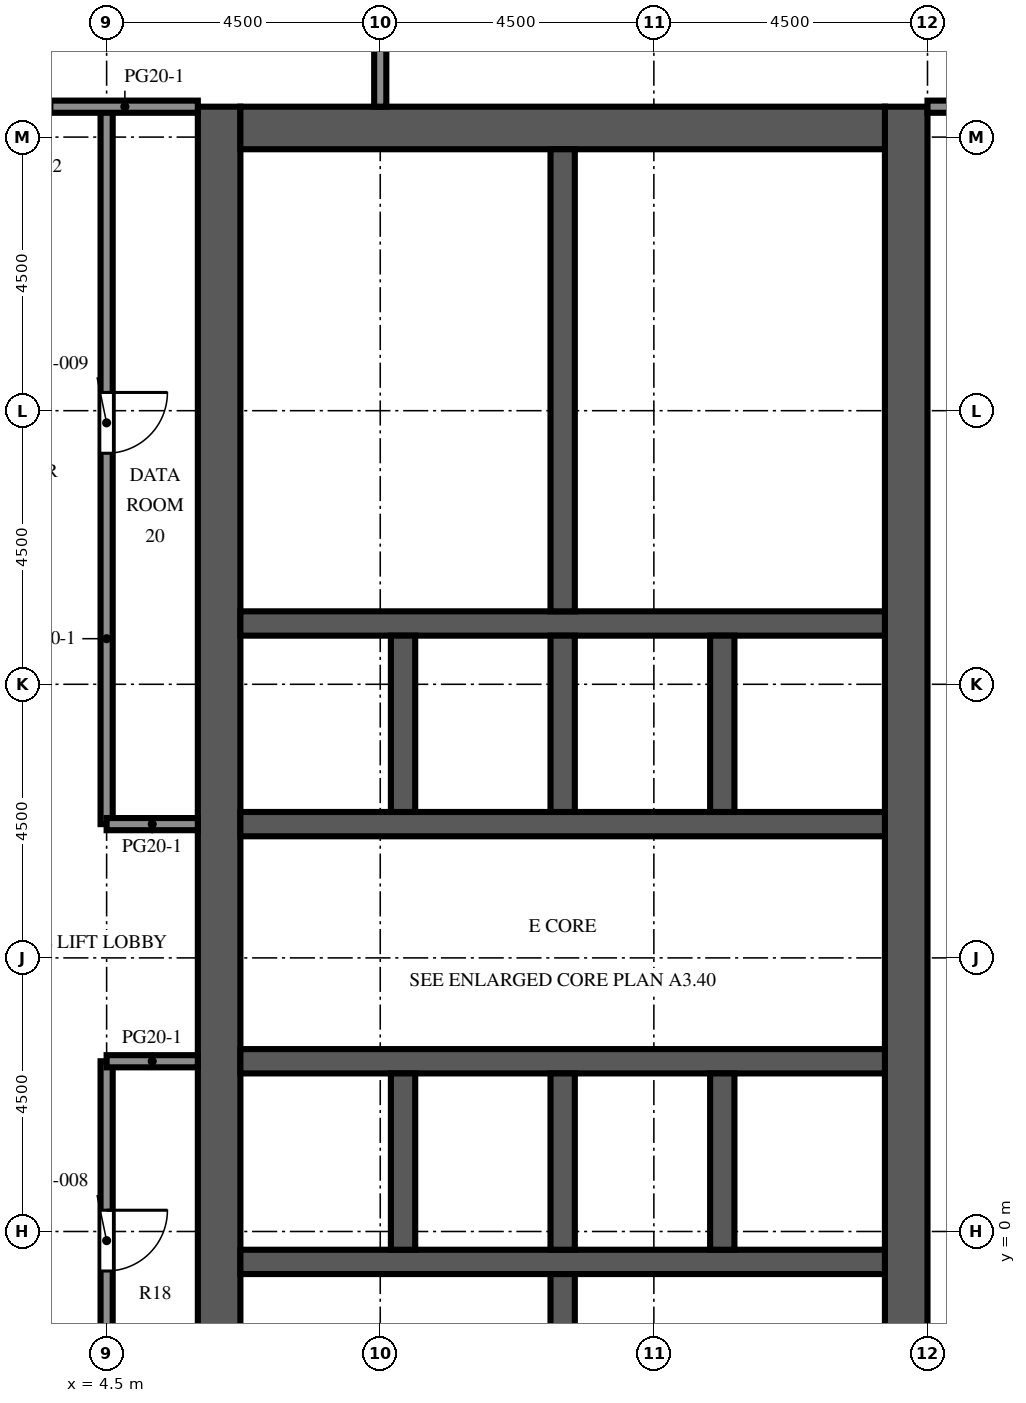
"""IFC4 building model, lengths in metres.
Left out: names, types, materials, properties, quantities, classifications, styles, units other than length and angle.
Written with IfcOpenShell. Run it as: python <this file> out.ifc"""

import sys

from ifc_helpers import new_model, si_unit, direction, frame, frame_2d, origin, place, context, subcontext, project, spatial, rectangle, extrude, element, fill, save


model = new_model("IFC4")
c1 = context("Model", 3, precision=1e-05, world=origin(), true_north=direction((0.0, 1.0)))
c2 = subcontext(c1, "Body", "Model", "MODEL_VIEW")
j1 = project(units=[si_unit("LENGTHUNIT", "METRE"), si_unit("PLANEANGLEUNIT", "RADIAN")], contexts=[c1])
p1 = place(None, origin())
s1 = spatial("IfcSite", under=j1, at=p1, CompositionType="ELEMENT")
p2 = place(p1, origin())
s2 = spatial("IfcBuilding", under=s1, at=p2, CompositionType="ELEMENT")
p3 = place(p2, frame((0.0, 0.0, 274.5)))
s3 = spatial("IfcBuildingStorey", under=s2, at=p3, CompositionType="ELEMENT", Elevation=274.5)
p4 = place(p3, frame((6.35, -9.0, 0.0), z_axis=(0.0, 0.0, 1.0), x_axis=(0.0, 1.0, 0.0)))
e1 = element("IfcWall", 1, at=p4, inside=s3, PredefinedType="SHEAR", context=c2, shape_type="SweptSolid", body=[
    extrude(rectangle(XDim=27.5, YDim=0.7, at=frame_2d((13.75, 0.0))), origin(), (0.0, 0.0, 1.0), 4.1),
])
p5 = place(p4, frame((12.55, 0.0, 0.0)))
e2 = element("IfcOpeningElement", 2, at=p5, cuts=e1, PredefinedType="OPENING", context=c2, shape_type="SweptSolid", body=[
    extrude(rectangle(XDim=2.4, YDim=2.4, at=frame_2d((1.2, 1.2))), frame((0.0, 0.36, 0.0), z_axis=(0.0, -1.0, 0.0), x_axis=(1.0, 0.0, 0.0)), (0.0, 0.0, 1.0), 0.72),
])
p6 = place(p4, frame((3.9, 0.0, 0.0)))
e3 = element("IfcOpeningElement", 3, at=p6, cuts=e1, PredefinedType="OPENING", context=c2, shape_type="SweptSolid", body=[
    extrude(rectangle(XDim=1.2, YDim=2.1, at=frame_2d((0.6, 1.05))), frame((0.0, 0.36, 0.0), z_axis=(0.0, -1.0, 0.0), x_axis=(1.0, 0.0, 0.0)), (0.0, 0.0, 1.0), 0.72),
])
p7 = place(p4, frame((19.46, 0.0, 0.0)))
e4 = element("IfcOpeningElement", 4, at=p7, cuts=e1, PredefinedType="OPENING", context=c2, shape_type="SweptSolid", body=[
    extrude(rectangle(XDim=1.0, YDim=2.1, at=frame_2d((0.5, 1.05))), frame((0.0, 0.36, 0.0), z_axis=(0.0, -1.0, 0.0), x_axis=(1.0, 0.0, 0.0)), (0.0, 0.0, 1.0), 0.72),
])
p8 = place(p4, frame((21.17, 0.0, 0.0)))
e5 = element("IfcOpeningElement", 5, at=p8, cuts=e1, PredefinedType="OPENING", context=c2, shape_type="SweptSolid", body=[
    extrude(rectangle(XDim=1.0, YDim=2.1, at=frame_2d((0.5, 1.05))), frame((0.0, 0.36, 0.0), z_axis=(0.0, -1.0, 0.0), x_axis=(1.0, 0.0, 0.0)), (0.0, 0.0, 1.0), 0.72),
])
p9 = place(p4, frame((23.26, 0.0, 0.0)))
e6 = element("IfcOpeningElement", 6, at=p9, cuts=e1, PredefinedType="OPENING", context=c2, shape_type="SweptSolid", body=[
    extrude(rectangle(XDim=1.0, YDim=2.1, at=frame_2d((0.5, 1.05))), frame((0.0, 0.36, 0.0), z_axis=(0.0, -1.0, 0.0), x_axis=(1.0, 0.0, 0.0)), (0.0, 0.0, 1.0), 0.72),
])
p10 = place(p4, frame((25.35, 0.0, 0.0)))
e7 = element("IfcOpeningElement", 7, at=p10, cuts=e1, PredefinedType="OPENING", context=c2, shape_type="SweptSolid", body=[
    extrude(rectangle(XDim=1.0, YDim=2.1, at=frame_2d((0.5, 1.05))), frame((0.0, 0.36, 0.0), z_axis=(0.0, -1.0, 0.0), x_axis=(1.0, 0.0, 0.0)), (0.0, 0.0, 1.0), 0.72),
])
p11 = place(p3, frame((17.65, -9.0, 0.0), z_axis=(0.0, 0.0, 1.0), x_axis=(0.0, 1.0, 0.0)))
e8 = element("IfcWall", 8, at=p11, inside=s3, PredefinedType="SHEAR", context=c2, shape_type="SweptSolid", body=[
    extrude(rectangle(XDim=27.5, YDim=0.7, at=frame_2d((13.75, 0.0))), origin(), (0.0, 0.0, 1.0), 4.1),
])
p12 = place(p11, frame((12.55, 0.0, 0.0)))
e9 = element("IfcOpeningElement", 9, at=p12, cuts=e8, PredefinedType="OPENING", context=c2, shape_type="SweptSolid", body=[
    extrude(rectangle(XDim=2.4, YDim=2.4, at=frame_2d((1.2, 1.2))), frame((0.0, 0.36, 0.0), z_axis=(0.0, -1.0, 0.0), x_axis=(1.0, 0.0, 0.0)), (0.0, 0.0, 1.0), 0.72),
])
p13 = place(p11, frame((6.825, 0.0, 0.0)))
e10 = element("IfcOpeningElement", 10, at=p13, cuts=e8, PredefinedType="OPENING", context=c2, shape_type="SweptSolid", body=[
    extrude(rectangle(XDim=1.2, YDim=2.1, at=frame_2d((0.6, 1.05))), frame((0.0, 0.36, 0.0), z_axis=(0.0, -1.0, 0.0), x_axis=(1.0, 0.0, 0.0)), (0.0, 0.0, 1.0), 0.72),
])
p14 = place(p11, frame((19.475, 0.0, 0.0)))
e11 = element("IfcOpeningElement", 11, at=p14, cuts=e8, PredefinedType="OPENING", context=c2, shape_type="SweptSolid", body=[
    extrude(rectangle(XDim=1.2, YDim=2.1, at=frame_2d((0.6, 1.05))), frame((0.0, 0.36, 0.0), z_axis=(0.0, -1.0, 0.0), x_axis=(1.0, 0.0, 0.0)), (0.0, 0.0, 1.0), 0.72),
])
p15 = place(p3, frame((6.7, 18.15, 0.0), z_axis=(0.0, 0.0, 1.0), x_axis=(1.0, 0.0, 0.0)))
e12 = element("IfcWall", 12, at=p15, inside=s3, PredefinedType="SHEAR", context=c2, shape_type="SweptSolid", body=[
    extrude(rectangle(XDim=10.6, YDim=0.7, at=frame_2d((5.3, 0.0))), origin(), (0.0, 0.0, 1.0), 4.1),
])
p16 = place(p3, frame((6.7, -0.5, 0.0), z_axis=(0.0, 0.0, 1.0), x_axis=(1.0, 0.0, 0.0)))
e13 = element("IfcWall", 13, at=p16, inside=s3, PredefinedType="SHEAR", context=c2, shape_type="SweptSolid", body=[
    extrude(rectangle(XDim=10.6, YDim=0.4, at=frame_2d((5.3, 0.0))), origin(), (0.0, 0.0, 1.0), 4.1),
])
p17 = place(p3, frame((6.7, 2.8, 0.0), z_axis=(0.0, 0.0, 1.0), x_axis=(1.0, 0.0, 0.0)))
e14 = element("IfcWall", 14, at=p17, inside=s3, PredefinedType="SHEAR", context=c2, shape_type="SweptSolid", body=[
    extrude(rectangle(XDim=10.6, YDim=0.4, at=frame_2d((5.3, 0.0))), origin(), (0.0, 0.0, 1.0), 4.1),
])
p18 = place(p17, frame((0.688, 0.0, 0.0)))
e15 = element("IfcOpeningElement", 15, at=p18, cuts=e14, PredefinedType="OPENING", context=c2, shape_type="SweptSolid", body=[
    extrude(rectangle(XDim=1.1, YDim=2.1, at=frame_2d((0.55, 1.05))), frame((0.0, 0.21, 0.0), z_axis=(0.0, -1.0, 0.0), x_axis=(1.0, 0.0, 0.0)), (0.0, 0.0, 1.0), 0.42),
])
p19 = place(p17, frame((3.438, 0.0, 0.0)))
e16 = element("IfcOpeningElement", 16, at=p19, cuts=e14, PredefinedType="OPENING", context=c2, shape_type="SweptSolid", body=[
    extrude(rectangle(XDim=1.1, YDim=2.1, at=frame_2d((0.55, 1.05))), frame((0.0, 0.21, 0.0), z_axis=(0.0, -1.0, 0.0), x_axis=(1.0, 0.0, 0.0)), (0.0, 0.0, 1.0), 0.42),
])
p20 = place(p17, frame((6.113, 0.0, 0.0)))
e17 = element("IfcOpeningElement", 17, at=p20, cuts=e14, PredefinedType="OPENING", context=c2, shape_type="SweptSolid", body=[
    extrude(rectangle(XDim=1.0, YDim=2.1, at=frame_2d((0.5, 1.05))), frame((0.0, 0.21, 0.0), z_axis=(0.0, -1.0, 0.0), x_axis=(1.0, 0.0, 0.0)), (0.0, 0.0, 1.0), 0.42),
])
p21 = place(p17, frame((8.863, 0.0, 0.0)))
e18 = element("IfcOpeningElement", 18, at=p21, cuts=e14, PredefinedType="OPENING", context=c2, shape_type="SweptSolid", body=[
    extrude(rectangle(XDim=1.0, YDim=2.1, at=frame_2d((0.5, 1.05))), frame((0.0, 0.21, 0.0), z_axis=(0.0, -1.0, 0.0), x_axis=(1.0, 0.0, 0.0)), (0.0, 0.0, 1.0), 0.42),
])
p22 = place(p3, frame((6.7, 6.7, 0.0), z_axis=(0.0, 0.0, 1.0), x_axis=(1.0, 0.0, 0.0)))
e19 = element("IfcWall", 19, at=p22, inside=s3, PredefinedType="SHEAR", context=c2, shape_type="SweptSolid", body=[
    extrude(rectangle(XDim=10.6, YDim=0.4, at=frame_2d((5.3, 0.0))), origin(), (0.0, 0.0, 1.0), 4.1),
])
p23 = place(p22, frame((3.438, 0.0, 0.0)))
e20 = element("IfcOpeningElement", 20, at=p23, cuts=e19, PredefinedType="OPENING", context=c2, shape_type="SweptSolid", body=[
    extrude(rectangle(XDim=1.1, YDim=2.1, at=frame_2d((0.55, 1.05))), frame((0.0, 0.21, 0.0), z_axis=(0.0, -1.0, 0.0), x_axis=(1.0, 0.0, 0.0)), (0.0, 0.0, 1.0), 0.42),
])
p24 = place(p22, frame((6.062, 0.0, 0.0)))
e21 = element("IfcOpeningElement", 21, at=p24, cuts=e19, PredefinedType="OPENING", context=c2, shape_type="SweptSolid", body=[
    extrude(rectangle(XDim=1.1, YDim=2.1, at=frame_2d((0.55, 1.05))), frame((0.0, 0.21, 0.0), z_axis=(0.0, -1.0, 0.0), x_axis=(1.0, 0.0, 0.0)), (0.0, 0.0, 1.0), 0.42),
])
p25 = place(p22, frame((8.812, 0.0, 0.0)))
e22 = element("IfcOpeningElement", 22, at=p25, cuts=e19, PredefinedType="OPENING", context=c2, shape_type="SweptSolid", body=[
    extrude(rectangle(XDim=1.1, YDim=2.1, at=frame_2d((0.55, 1.05))), frame((0.0, 0.21, 0.0), z_axis=(0.0, -1.0, 0.0), x_axis=(1.0, 0.0, 0.0)), (0.0, 0.0, 1.0), 0.42),
])
p26 = place(p22, frame((0.738, 0.0, 0.0)))
e23 = element("IfcOpeningElement", 23, at=p26, cuts=e19, PredefinedType="OPENING", context=c2, shape_type="SweptSolid", body=[
    extrude(rectangle(XDim=1.0, YDim=2.1, at=frame_2d((0.5, 1.05))), frame((0.0, 0.21, 0.0), z_axis=(0.0, -1.0, 0.0), x_axis=(1.0, 0.0, 0.0)), (0.0, 0.0, 1.0), 0.42),
])
p27 = place(p3, frame((6.7, 10.0, 0.0), z_axis=(0.0, 0.0, 1.0), x_axis=(1.0, 0.0, 0.0)))
e24 = element("IfcWall", 24, at=p27, inside=s3, PredefinedType="SHEAR", context=c2, shape_type="SweptSolid", body=[
    extrude(rectangle(XDim=10.6, YDim=0.4, at=frame_2d((5.3, 0.0))), origin(), (0.0, 0.0, 1.0), 4.1),
])
for number, where, z_axis, x_axis in (
    (25, (9.375, -0.3, 0.0), (0.0, 0.0, 1.0), (0.0, 1.0, 0.0)),
    (26, (9.375, 6.9, 0.0), (0.0, 0.0, 1.0), (0.0, 1.0, 0.0)),
    (27, (12.0, -0.3, 0.0), (0.0, 0.0, 1.0), (0.0, 1.0, 0.0)),
    (28, (12.0, 6.9, 0.0), (0.0, 0.0, 1.0), (0.0, 1.0, 0.0)),
    (29, (14.625, -0.3, 0.0), (0.0, 0.0, 1.0), (0.0, 1.0, 0.0)),
    (30, (14.625, 6.9, 0.0), (0.0, 0.0, 1.0), (0.0, 1.0, 0.0)),
):
    element("IfcWall", number, at=place(p3, frame(where, z_axis=z_axis, x_axis=x_axis)), inside=s3, PredefinedType="SHEAR", context=c2, shape_type="SweptSolid", body=[
        extrude(rectangle(XDim=2.9, YDim=0.4, at=frame_2d((1.45, 0.0))), origin(), (0.0, 0.0, 1.0), 4.1),
    ])
for number, where, z_axis, x_axis in (
    (31, (12.0, -8.3, 0.0), (0.0, 0.0, 1.0), (0.0, 1.0, 0.0)),
    (32, (12.0, 10.2, 0.0), (0.0, 0.0, 1.0), (0.0, 1.0, 0.0)),
):
    element("IfcWall", number, at=place(p3, frame(where, z_axis=z_axis, x_axis=x_axis)), inside=s3, PredefinedType="SHEAR", context=c2, shape_type="SweptSolid", body=[
        extrude(rectangle(XDim=7.6, YDim=0.4, at=frame_2d((3.8, 0.0))), origin(), (0.0, 0.0, 1.0), 4.1),
    ])
for number, where, z_axis, x_axis in (
    (33, (6.7, 11.72, 0.0), (0.0, 0.0, 1.0), (1.0, 0.0, 0.0)),
    (34, (6.7, 13.62, 0.0), (0.0, 0.0, 1.0), (1.0, 0.0, 0.0)),
    (35, (6.7, 15.9, 0.0), (0.0, 0.0, 1.0), (1.0, 0.0, 0.0)),
):
    element("IfcWall", number, at=place(p3, frame(where, z_axis=z_axis, x_axis=x_axis)), inside=s3, PredefinedType="PARTITIONING", context=c2, shape_type="SweptSolid", body=[
        extrude(rectangle(XDim=5.1, YDim=0.1, at=frame_2d((2.55, 0.0))), origin(), (0.0, 0.0, 1.0), 3.65),
    ])
p28 = place(p3, frame((4.5, 2.8, 0.0), z_axis=(0.0, 0.0, 1.0), x_axis=(0.0, -1.0, 0.0)))
e36 = element("IfcWall", 36, at=p28, inside=s3, PredefinedType="PARTITIONING", context=c2, shape_type="SweptSolid", body=[
    extrude(rectangle(XDim=6.3, YDim=0.2, at=frame_2d((3.15, 0.0))), origin(), (0.0, 0.0, 1.0), 3.65),
])
p29 = place(p28, frame((2.45, 0.0, 0.0)))
e37 = element("IfcOpeningElement", 37, at=p29, cuts=e36, PredefinedType="OPENING", context=c2, shape_type="SweptSolid", body=[
    extrude(rectangle(XDim=1.0, YDim=2.1, at=frame_2d((0.5, 1.05))), frame((0.0, 0.11, 0.0), z_axis=(0.0, -1.0, 0.0), x_axis=(1.0, 0.0, 0.0)), (0.0, 0.0, 1.0), 0.22),
])
p30 = place(p3, frame((4.5, 18.5, 0.0), z_axis=(0.0, 0.0, 1.0), x_axis=(0.0, -1.0, 0.0)))
e38 = element("IfcWall", 38, at=p30, inside=s3, PredefinedType="PARTITIONING", context=c2, shape_type="SweptSolid", body=[
    extrude(rectangle(XDim=11.8, YDim=0.2, at=frame_2d((5.9, 0.0))), origin(), (0.0, 0.0, 1.0), 3.65),
])
p31 = place(p30, frame((4.7, 0.0, 0.0)))
e39 = element("IfcOpeningElement", 39, at=p31, cuts=e38, PredefinedType="OPENING", context=c2, shape_type="SweptSolid", body=[
    extrude(rectangle(XDim=1.0, YDim=2.1, at=frame_2d((0.5, 1.05))), frame((0.0, 0.11, 0.0), z_axis=(0.0, -1.0, 0.0), x_axis=(1.0, 0.0, 0.0)), (0.0, 0.0, 1.0), 0.22),
])
p32 = place(p3, frame((9.0, 18.5, 0.0), z_axis=(0.0, 0.0, 1.0), x_axis=(0.0, 1.0, 0.0)))
e40 = element("IfcWall", 40, at=p32, inside=s3, PredefinedType="PARTITIONING", context=c2, shape_type="SweptSolid", body=[
    extrude(rectangle(XDim=3.5, YDim=0.2, at=frame_2d((1.75, 0.0))), origin(), (0.0, 0.0, 1.0), 3.65),
])
for number, where, z_axis, x_axis in (
    (41, (4.5, 2.8, 0.0), (0.0, 0.0, 1.0), (1.0, 0.0, 0.0)),
    (42, (4.5, 6.7, 0.0), (0.0, 0.0, 1.0), (1.0, 0.0, 0.0)),
):
    element("IfcWall", number, at=place(p3, frame(where, z_axis=z_axis, x_axis=x_axis)), inside=s3, PredefinedType="PARTITIONING", context=c2, shape_type="SweptSolid", body=[
        extrude(rectangle(XDim=1.5, YDim=0.2, at=frame_2d((0.75, 0.0))), origin(), (0.0, 0.0, 1.0), 3.65),
    ])
p33 = place(p3, frame((1.5, 18.5, 0.0), z_axis=(0.0, 0.0, 1.0), x_axis=(1.0, 0.0, 0.0)))
e43 = element("IfcWall", 43, at=p33, inside=s3, PredefinedType="PARTITIONING", context=c2, shape_type="SweptSolid", body=[
    extrude(rectangle(XDim=4.5, YDim=0.2, at=frame_2d((2.25, 0.0))), origin(), (0.0, 0.0, 1.0), 3.65),
])
p34 = place(p33, frame((1.1, 0.0, 0.0)))
e44 = element("IfcOpeningElement", 44, at=p34, cuts=e43, PredefinedType="OPENING", context=c2, shape_type="SweptSolid", body=[
    extrude(rectangle(XDim=1.0, YDim=2.1, at=frame_2d((0.5, 1.05))), frame((0.0, 0.11, 0.0), z_axis=(0.0, -1.0, 0.0), x_axis=(1.0, 0.0, 0.0)), (0.0, 0.0, 1.0), 0.22),
])
p35 = place(p3, frame((18.0, 18.5, 0.0), z_axis=(0.0, 0.0, 1.0), x_axis=(1.0, 0.0, 0.0)))
e45 = element("IfcWall", 45, at=p35, inside=s3, PredefinedType="PARTITIONING", context=c2, shape_type="SweptSolid", body=[
    extrude(rectangle(XDim=4.201, YDim=0.2, at=frame_2d((2.101, 0.0))), origin(), (0.0, 0.0, 1.0), 3.65),
])
p36 = place(p35, frame((2.1, 0.0, 0.0)))
e46 = element("IfcOpeningElement", 46, at=p36, cuts=e45, PredefinedType="OPENING", context=c2, shape_type="SweptSolid", body=[
    extrude(rectangle(XDim=1.0, YDim=2.1, at=frame_2d((0.5, 1.05))), frame((0.0, 0.11, 0.0), z_axis=(0.0, -1.0, 0.0), x_axis=(1.0, 0.0, 0.0)), (0.0, 0.0, 1.0), 0.22),
])
p37 = place(p18, origin())
e47 = element("IfcDoor", 47, at=p37, inside=s3, OperationType="DOUBLE_DOOR_SLIDING", PredefinedType="DOOR", context=c2, shape_type="SweptSolid", body=[
    extrude(rectangle(XDim=1.1, YDim=2.1, at=frame_2d((0.55, 1.05))), frame((0.0, 0.025, 0.0), z_axis=(0.0, -1.0, 0.0), x_axis=(1.0, 0.0, 0.0)), (0.0, 0.0, 1.0), 0.05),
])
fill(e15, e47)
p38 = place(p19, origin())
e48 = element("IfcDoor", 48, at=p38, inside=s3, OperationType="DOUBLE_DOOR_SLIDING", PredefinedType="DOOR", context=c2, shape_type="SweptSolid", body=[
    extrude(rectangle(XDim=1.1, YDim=2.1, at=frame_2d((0.55, 1.05))), frame((0.0, 0.025, 0.0), z_axis=(0.0, -1.0, 0.0), x_axis=(1.0, 0.0, 0.0)), (0.0, 0.0, 1.0), 0.05),
])
fill(e16, e48)
p39 = place(p23, origin())
e49 = element("IfcDoor", 49, at=p39, inside=s3, OperationType="DOUBLE_DOOR_SLIDING", PredefinedType="DOOR", context=c2, shape_type="SweptSolid", body=[
    extrude(rectangle(XDim=1.1, YDim=2.1, at=frame_2d((0.55, 1.05))), frame((0.0, 0.025, 0.0), z_axis=(0.0, -1.0, 0.0), x_axis=(1.0, 0.0, 0.0)), (0.0, 0.0, 1.0), 0.05),
])
fill(e20, e49)
p40 = place(p24, origin())
e50 = element("IfcDoor", 50, at=p40, inside=s3, OperationType="DOUBLE_DOOR_SLIDING", PredefinedType="DOOR", context=c2, shape_type="SweptSolid", body=[
    extrude(rectangle(XDim=1.1, YDim=2.1, at=frame_2d((0.55, 1.05))), frame((0.0, 0.025, 0.0), z_axis=(0.0, -1.0, 0.0), x_axis=(1.0, 0.0, 0.0)), (0.0, 0.0, 1.0), 0.05),
])
fill(e21, e50)
p41 = place(p25, origin())
e51 = element("IfcDoor", 51, at=p41, inside=s3, OperationType="DOUBLE_DOOR_SLIDING", PredefinedType="DOOR", context=c2, shape_type="SweptSolid", body=[
    extrude(rectangle(XDim=1.1, YDim=2.1, at=frame_2d((0.55, 1.05))), frame((0.0, 0.025, 0.0), z_axis=(0.0, -1.0, 0.0), x_axis=(1.0, 0.0, 0.0)), (0.0, 0.0, 1.0), 0.05),
])
fill(e22, e51)
p42 = place(p5, origin())
e52 = element("IfcDoor", 52, at=p42, inside=s3, OperationType="DOUBLE_DOOR_DOUBLE_SWING", PredefinedType="DOOR", context=c2, shape_type="SweptSolid", body=[
    extrude(rectangle(XDim=2.4, YDim=2.4, at=frame_2d((1.2, 1.2))), frame((0.0, 0.025, 0.0), z_axis=(0.0, -1.0, 0.0), x_axis=(1.0, 0.0, 0.0)), (0.0, 0.0, 1.0), 0.05),
])
fill(e2, e52)
p43 = place(p12, origin())
e53 = element("IfcDoor", 53, at=p43, inside=s3, OperationType="DOUBLE_DOOR_DOUBLE_SWING", PredefinedType="DOOR", context=c2, shape_type="SweptSolid", body=[
    extrude(rectangle(XDim=2.4, YDim=2.4, at=frame_2d((1.2, 1.2))), frame((0.0, 0.025, 0.0), z_axis=(0.0, -1.0, 0.0), x_axis=(1.0, 0.0, 0.0)), (0.0, 0.0, 1.0), 0.05),
])
fill(e9, e53)
p44 = place(p13, frame((1.2, 0.0, 0.0), z_axis=(0.0, 0.0, 1.0), x_axis=(-1.0, 0.0, 0.0)))
e54 = element("IfcDoor", 54, at=p44, inside=s3, OperationType="SINGLE_SWING_LEFT", PredefinedType="DOOR", context=c2, shape_type="SweptSolid", body=[
    extrude(rectangle(XDim=1.2, YDim=2.1, at=frame_2d((0.6, 1.05))), frame((0.0, 0.025, 0.0), z_axis=(0.0, -1.0, 0.0), x_axis=(1.0, 0.0, 0.0)), (0.0, 0.0, 1.0), 0.05),
])
fill(e10, e54)
p45 = place(p14, frame((1.2, 0.0, 0.0), z_axis=(0.0, 0.0, 1.0), x_axis=(-1.0, 0.0, 0.0)))
e55 = element("IfcDoor", 55, at=p45, inside=s3, OperationType="SINGLE_SWING_LEFT", PredefinedType="DOOR", context=c2, shape_type="SweptSolid", body=[
    extrude(rectangle(XDim=1.2, YDim=2.1, at=frame_2d((0.6, 1.05))), frame((0.0, 0.025, 0.0), z_axis=(0.0, -1.0, 0.0), x_axis=(1.0, 0.0, 0.0)), (0.0, 0.0, 1.0), 0.05),
])
fill(e11, e55)
p46 = place(p20, origin())
e56 = element("IfcDoor", 56, at=p46, inside=s3, OperationType="SINGLE_SWING_LEFT", PredefinedType="DOOR", context=c2, shape_type="SweptSolid", body=[
    extrude(rectangle(XDim=1.0, YDim=2.1, at=frame_2d((0.5, 1.05))), frame((0.0, 0.025, 0.0), z_axis=(0.0, -1.0, 0.0), x_axis=(1.0, 0.0, 0.0)), (0.0, 0.0, 1.0), 0.05),
])
fill(e17, e56)
p47 = place(p21, origin())
e57 = element("IfcDoor", 57, at=p47, inside=s3, OperationType="SINGLE_SWING_RIGHT", PredefinedType="DOOR", context=c2, shape_type="SweptSolid", body=[
    extrude(rectangle(XDim=1.0, YDim=2.1, at=frame_2d((0.5, 1.05))), frame((0.0, 0.025, 0.0), z_axis=(0.0, -1.0, 0.0), x_axis=(1.0, 0.0, 0.0)), (0.0, 0.0, 1.0), 0.05),
])
fill(e18, e57)
p48 = place(p26, origin())
e58 = element("IfcDoor", 58, at=p48, inside=s3, OperationType="SINGLE_SWING_LEFT", PredefinedType="DOOR", context=c2, shape_type="SweptSolid", body=[
    extrude(rectangle(XDim=1.0, YDim=2.1, at=frame_2d((0.5, 1.05))), frame((0.0, 0.025, 0.0), z_axis=(0.0, -1.0, 0.0), x_axis=(1.0, 0.0, 0.0)), (0.0, 0.0, 1.0), 0.05),
])
fill(e23, e58)
p49 = place(p7, origin())
e59 = element("IfcDoor", 59, at=p49, inside=s3, OperationType="SINGLE_SWING_RIGHT", PredefinedType="DOOR", context=c2, shape_type="SweptSolid", body=[
    extrude(rectangle(XDim=1.0, YDim=2.1, at=frame_2d((0.5, 1.05))), frame((0.0, -0.275, 0.0), z_axis=(0.0, -1.0, 0.0), x_axis=(1.0, 0.0, 0.0)), (0.0, 0.0, 1.0), 0.05),
])
fill(e4, e59)
p50 = place(p8, origin())
e60 = element("IfcDoor", 60, at=p50, inside=s3, OperationType="SINGLE_SWING_LEFT", PredefinedType="DOOR", context=c2, shape_type="SweptSolid", body=[
    extrude(rectangle(XDim=1.0, YDim=2.1, at=frame_2d((0.5, 1.05))), frame((0.0, -0.275, 0.0), z_axis=(0.0, -1.0, 0.0), x_axis=(1.0, 0.0, 0.0)), (0.0, 0.0, 1.0), 0.05),
])
fill(e5, e60)
p51 = place(p9, origin())
e61 = element("IfcDoor", 61, at=p51, inside=s3, OperationType="SINGLE_SWING_RIGHT", PredefinedType="DOOR", context=c2, shape_type="SweptSolid", body=[
    extrude(rectangle(XDim=1.0, YDim=2.1, at=frame_2d((0.5, 1.05))), frame((0.0, -0.275, 0.0), z_axis=(0.0, -1.0, 0.0), x_axis=(1.0, 0.0, 0.0)), (0.0, 0.0, 1.0), 0.05),
])
fill(e6, e61)
p52 = place(p10, origin())
e62 = element("IfcDoor", 62, at=p52, inside=s3, OperationType="SINGLE_SWING_LEFT", PredefinedType="DOOR", context=c2, shape_type="SweptSolid", body=[
    extrude(rectangle(XDim=1.0, YDim=2.1, at=frame_2d((0.5, 1.05))), frame((0.0, -0.275, 0.0), z_axis=(0.0, -1.0, 0.0), x_axis=(1.0, 0.0, 0.0)), (0.0, 0.0, 1.0), 0.05),
])
fill(e7, e62)
p53 = place(p29, origin())
e63 = element("IfcDoor", 63, at=p53, inside=s3, OperationType="SINGLE_SWING_LEFT", PredefinedType="DOOR", context=c2, shape_type="SweptSolid", body=[
    extrude(rectangle(XDim=1.0, YDim=2.1, at=frame_2d((0.5, 1.05))), frame((0.0, 0.025, 0.0), z_axis=(0.0, -1.0, 0.0), x_axis=(1.0, 0.0, 0.0)), (0.0, 0.0, 1.0), 0.05),
])
fill(e37, e63)
p54 = place(p31, origin())
e64 = element("IfcDoor", 64, at=p54, inside=s3, OperationType="SINGLE_SWING_LEFT", PredefinedType="DOOR", context=c2, shape_type="SweptSolid", body=[
    extrude(rectangle(XDim=1.0, YDim=2.1, at=frame_2d((0.5, 1.05))), frame((0.0, 0.025, 0.0), z_axis=(0.0, -1.0, 0.0), x_axis=(1.0, 0.0, 0.0)), (0.0, 0.0, 1.0), 0.05),
])
fill(e39, e64)
save(model, sys.argv[1])
